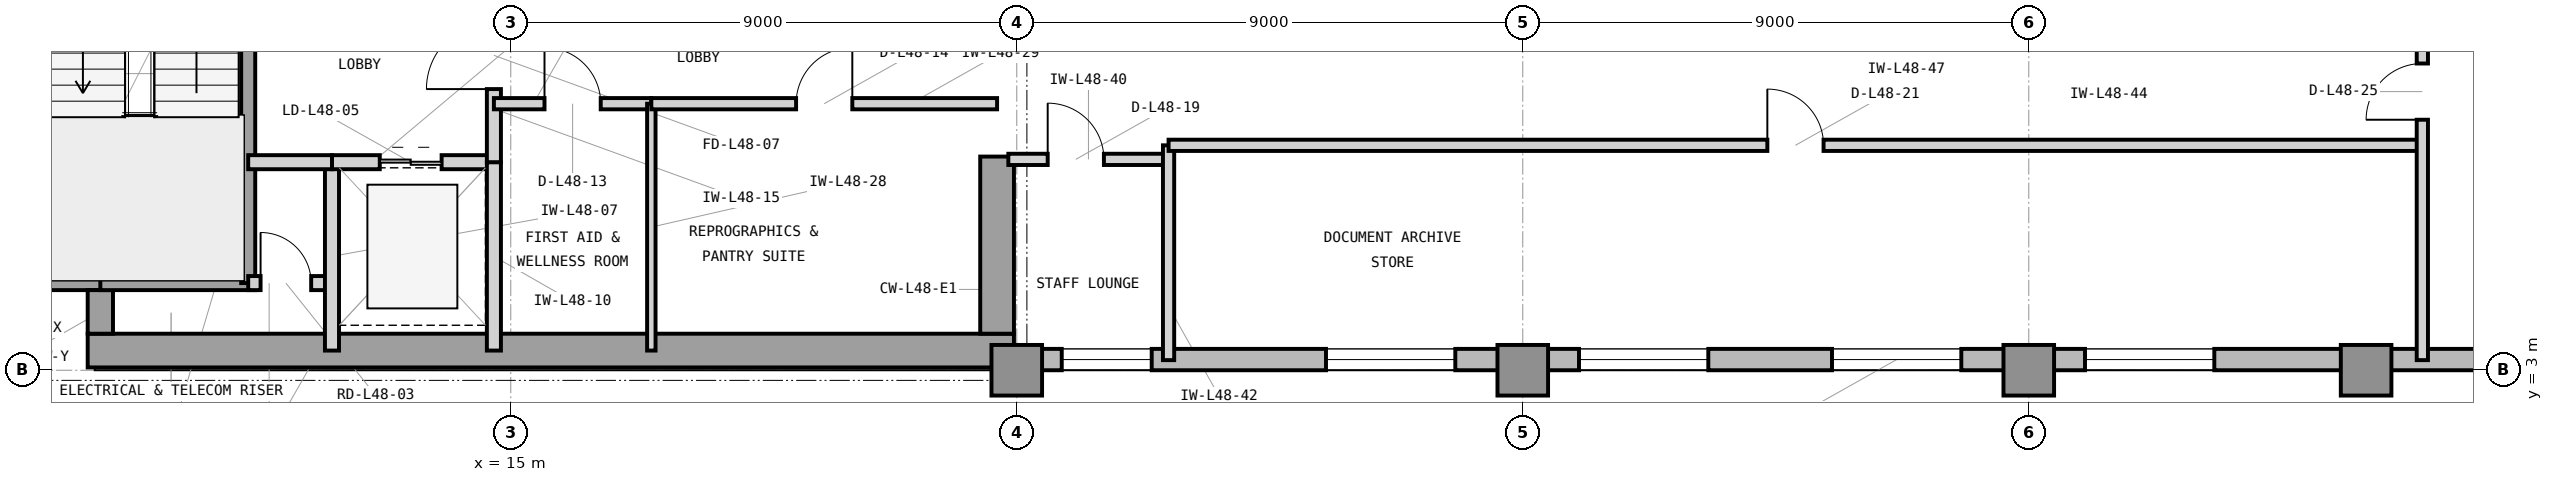
"""IFC4 building model, lengths in metres.
Left out: names, types, materials, properties, quantities, classifications, styles, units other than length and angle.
Written with IfcOpenShell. Run it as: python <this file> out.ifc"""

import sys

from ifc_helpers import new_model, si_unit, direction, frame, frame_2d, origin, origin_2d, place, context, subcontext, project, spatial, rectangle, extrude, element, fill, save


model = new_model("IFC4")
c1 = context("Model", 3, precision=1e-05, world=origin(), true_north=direction((0.0, 1.0)))
c2 = subcontext(c1, "Body", "Model", "MODEL_VIEW")
j1 = project(units=[si_unit("LENGTHUNIT", "METRE"), si_unit("PLANEANGLEUNIT", "RADIAN")], contexts=[c1])
p1 = place(None, origin())
s1 = spatial("IfcSite", under=j1, at=p1, CompositionType="ELEMENT")
p2 = place(p1, origin())
s2 = spatial("IfcBuilding", under=s1, at=p2, CompositionType="ELEMENT")
p3 = place(p2, frame((0.0, 0.0, 199.5)))
s3 = spatial("IfcBuildingStorey", under=s2, at=p3, CompositionType="ELEMENT", Elevation=199.5)
p4 = place(p3, frame((7.475, 3.35, 0.0), z_axis=(0.0, 0.0, 1.0), x_axis=(1.0, 0.0, 0.0)))
e1 = element("IfcWall", 1, at=p4, inside=s3, PredefinedType="SHEAR", context=c2, shape_type="SweptSolid", body=[
    extrude(rectangle(XDim=16.475, YDim=0.6, at=frame_2d((8.237, 0.0))), origin(), (0.0, 0.0, 1.0), 3.9),
])
p5 = place(p3, frame((23.65, 3.65, 0.0), z_axis=(0.0, 0.0, 1.0), x_axis=(0.0, 1.0, 0.0)))
e2 = element("IfcWall", 2, at=p5, inside=s3, PredefinedType="SHEAR", context=c2, shape_type="SweptSolid", body=[
    extrude(rectangle(XDim=3.15, YDim=0.6, at=frame_2d((1.575, 0.0))), origin(), (0.0, 0.0, 1.0), 3.9),
])
p6 = place(p3, frame((6.65, 4.65, 0.0), z_axis=(0.0, 0.0, 1.0), x_axis=(1.0, 0.0, 0.0)))
e3 = element("IfcWall", 3, at=p6, inside=s3, PredefinedType="SHEAR", context=c2, shape_type="SweptSolid", body=[
    extrude(rectangle(XDim=1.275, YDim=0.45, at=frame_2d((0.638, 0.0))), origin(), (0.0, 0.0, 1.0), 3.9),
])
p7 = place(p3, frame((7.7, 3.65, 0.0), z_axis=(0.0, 0.0, 1.0), x_axis=(0.0, 1.0, 0.0)))
e4 = element("IfcWall", 4, at=p7, inside=s3, PredefinedType="SHEAR", context=c2, shape_type="SweptSolid", body=[
    extrude(rectangle(XDim=0.775, YDim=0.45, at=frame_2d((0.388, 0.0))), origin(), (0.0, 0.0, 1.0), 3.9),
])
for number, where, z_axis, x_axis in (
    (5, (24.0, 3.0, 0.0), (0.0, 0.0, 1.0), (1.0, 0.0, 0.0)),
    (6, (33.0, 3.0, 0.0), (0.0, 0.0, 1.0), (1.0, 0.0, 0.0)),
    (7, (42.0, 3.0, 0.0), (0.0, 0.0, 1.0), (1.0, 0.0, 0.0)),
    (8, (48.0, 3.0, 0.0), (0.0, 0.0, 1.0), (1.0, 0.0, 0.0)),
):
    element("IfcColumn", number, at=place(p3, frame(where, z_axis=z_axis, x_axis=x_axis)), inside=s3, PredefinedType="COLUMN", context=c2, shape_type="SweptSolid", body=[
        extrude(rectangle(XDim=0.9, YDim=0.9, at=origin_2d()), origin(), (0.0, 0.0, 1.0), 3.9),
    ])
p8 = place(p3, frame((23.9, 3.19, 0.0), z_axis=(0.0, 0.0, 1.0), x_axis=(1.0, 0.0, 0.0)))
e9 = element("IfcWall", 9, at=p8, inside=s3, PredefinedType="STANDARD", context=c2, shape_type="SweptSolid", body=[
    extrude(rectangle(XDim=31.5, YDim=0.38, at=frame_2d((15.75, 0.0))), origin(), (0.0, 0.0, 1.0), 3.7),
])
p9 = place(p8, frame((5.6, 0.0, 0.9)))
e10 = element("IfcOpeningElement", 10, at=p9, cuts=e9, PredefinedType="OPENING", context=c2, shape_type="SweptSolid", body=[
    extrude(rectangle(XDim=2.3, YDim=2.2, at=frame_2d((1.15, 1.1))), frame((0.0, 0.2, 0.0), z_axis=(0.0, -1.0, 0.0), x_axis=(1.0, 0.0, 0.0)), (0.0, 0.0, 1.0), 0.4),
])
p10 = place(p8, frame((10.1, 0.0, 0.9)))
e11 = element("IfcOpeningElement", 11, at=p10, cuts=e9, PredefinedType="OPENING", context=c2, shape_type="SweptSolid", body=[
    extrude(rectangle(XDim=2.3, YDim=2.2, at=frame_2d((1.15, 1.1))), frame((0.0, 0.2, 0.0), z_axis=(0.0, -1.0, 0.0), x_axis=(1.0, 0.0, 0.0)), (0.0, 0.0, 1.0), 0.4),
])
p11 = place(p8, frame((14.6, 0.0, 0.9)))
e12 = element("IfcOpeningElement", 12, at=p11, cuts=e9, PredefinedType="OPENING", context=c2, shape_type="SweptSolid", body=[
    extrude(rectangle(XDim=2.3, YDim=2.2, at=frame_2d((1.15, 1.1))), frame((0.0, 0.2, 0.0), z_axis=(0.0, -1.0, 0.0), x_axis=(1.0, 0.0, 0.0)), (0.0, 0.0, 1.0), 0.4),
])
p12 = place(p8, frame((19.1, 0.0, 0.9)))
e13 = element("IfcOpeningElement", 13, at=p12, cuts=e9, PredefinedType="OPENING", context=c2, shape_type="SweptSolid", body=[
    extrude(rectangle(XDim=2.3, YDim=2.2, at=frame_2d((1.15, 1.1))), frame((0.0, 0.2, 0.0), z_axis=(0.0, -1.0, 0.0), x_axis=(1.0, 0.0, 0.0)), (0.0, 0.0, 1.0), 0.4),
])
p13 = place(p8, frame((0.9, 0.0, 0.9)))
e14 = element("IfcOpeningElement", 14, at=p13, cuts=e9, PredefinedType="OPENING", context=c2, shape_type="SweptSolid", body=[
    extrude(rectangle(XDim=1.6, YDim=2.2, at=frame_2d((0.8, 1.1))), frame((0.0, 0.2, 0.0), z_axis=(0.0, -1.0, 0.0), x_axis=(1.0, 0.0, 0.0)), (0.0, 0.0, 1.0), 0.4),
])
p14 = place(p3, frame((7.7, 4.55, 0.0), z_axis=(0.0, 0.0, 1.0), x_axis=(1.0, 0.0, 0.0)))
e15 = element("IfcWall", 15, at=p14, inside=s3, PredefinedType="SHEAR", context=c2, shape_type="SweptSolid", body=[
    extrude(rectangle(XDim=2.755, YDim=0.25, at=frame_2d((1.377, 0.0))), origin(), (0.0, 0.0, 1.0), 3.9),
])
p15 = place(p3, frame((10.33, 4.55, 0.0), z_axis=(0.0, 0.0, 1.0), x_axis=(0.0, 1.0, 0.0)))
e16 = element("IfcWall", 16, at=p15, inside=s3, PredefinedType="SHEAR", context=c2, shape_type="SweptSolid", body=[
    extrude(rectangle(XDim=7.45, YDim=0.25, at=frame_2d((3.725, 0.0))), origin(), (0.0, 0.0, 1.0), 3.9),
])
p16 = place(p15, frame((5.9, 0.0, 0.0)))
e17 = element("IfcOpeningElement", 17, at=p16, cuts=e16, PredefinedType="OPENING", context=c2, shape_type="SweptSolid", body=[
    extrude(rectangle(XDim=1.25, YDim=2.2, at=frame_2d((0.625, 1.1))), frame((0.0, 0.135, 0.0), z_axis=(0.0, -1.0, 0.0), x_axis=(1.0, 0.0, 0.0)), (0.0, 0.0, 1.0), 0.27),
])
p17 = place(p3, frame((10.33, 4.55, 0.0), z_axis=(0.0, 0.0, 1.0), x_axis=(1.0, 0.0, 0.0)))
e18 = element("IfcWall", 18, at=p17, inside=s3, PredefinedType="PARTITIONING", context=c2, shape_type="SweptSolid", body=[
    extrude(rectangle(XDim=1.49, YDim=0.25, at=frame_2d((0.745, 0.0))), origin(), (0.0, 0.0, 1.0), 3.69),
])
p18 = place(p17, frame((0.22, 0.0, 0.0)))
e19 = element("IfcOpeningElement", 19, at=p18, cuts=e18, PredefinedType="OPENING", context=c2, shape_type="SweptSolid", body=[
    extrude(rectangle(XDim=0.9, YDim=2.1, at=frame_2d((0.45, 1.05))), frame((0.0, 0.135, 0.0), z_axis=(0.0, -1.0, 0.0), x_axis=(1.0, 0.0, 0.0)), (0.0, 0.0, 1.0), 0.27),
])
p19 = place(p3, frame((11.82, 3.35, 0.0), z_axis=(0.0, 0.0, 1.0), x_axis=(0.0, 1.0, 0.0)))
e20 = element("IfcWall", 20, at=p19, inside=s3, PredefinedType="PARTITIONING", context=c2, shape_type="SweptSolid", body=[
    extrude(rectangle(XDim=3.35, YDim=0.25, at=frame_2d((1.675, 0.0))), origin(), (0.0, 0.0, 1.0), 3.69),
])
p20 = place(p3, frame((11.82, 6.7, 0.0), z_axis=(0.0, 0.0, 1.0), x_axis=(1.0, 0.0, 0.0)))
e21 = element("IfcWall", 21, at=p20, inside=s3, PredefinedType="PARTITIONING", context=c2, shape_type="SweptSolid", body=[
    extrude(rectangle(XDim=2.88, YDim=0.25, at=frame_2d((1.44, 0.0))), origin(), (0.0, 0.0, 1.0), 3.283),
])
p21 = place(p20, frame((0.85, 0.0, 0.0)))
e22 = element("IfcOpeningElement", 22, at=p21, cuts=e21, PredefinedType="OPENING", context=c2, shape_type="SweptSolid", body=[
    extrude(rectangle(XDim=1.1, YDim=2.25, at=frame_2d((0.55, 1.125))), frame((0.0, 0.135, 0.0), z_axis=(0.0, -1.0, 0.0), x_axis=(1.0, 0.0, 0.0)), (0.0, 0.0, 1.0), 0.27),
])
p22 = place(p3, frame((14.7, 3.35, 0.0), z_axis=(0.0, 0.0, 1.0), x_axis=(0.0, 1.0, 0.0)))
e23 = element("IfcWall", 23, at=p22, inside=s3, PredefinedType="PARTITIONING", context=c2, shape_type="SweptSolid", body=[
    extrude(rectangle(XDim=3.35, YDim=0.25, at=frame_2d((1.675, 0.0))), origin(), (0.0, 0.0, 1.0), 3.69),
])
p23 = place(p3, frame((14.7, 6.7, 0.0), z_axis=(0.0, 0.0, 1.0), x_axis=(0.0, 1.0, 0.0)))
e24 = element("IfcWall", 24, at=p23, inside=s3, PredefinedType="PARTITIONING", context=c2, shape_type="SweptSolid", body=[
    extrude(rectangle(XDim=3.8, YDim=0.25, at=frame_2d((1.9, 0.0))), origin(), (0.0, 0.0, 1.0), 3.69),
])
p24 = place(p23, frame((1.3, 0.0, 0.0)))
e25 = element("IfcOpeningElement", 25, at=p24, cuts=e24, PredefinedType="OPENING", context=c2, shape_type="SweptSolid", body=[
    extrude(rectangle(XDim=1.2, YDim=2.2, at=frame_2d((0.6, 1.1))), frame((0.0, 0.135, 0.0), z_axis=(0.0, -1.0, 0.0), x_axis=(1.0, 0.0, 0.0)), (0.0, 0.0, 1.0), 0.27),
])
p25 = place(p3, frame((10.33, 6.7, 0.0), z_axis=(0.0, 0.0, 1.0), x_axis=(1.0, 0.0, 0.0)))
e26 = element("IfcWall", 26, at=p25, inside=s3, PredefinedType="PARTITIONING", context=c2, shape_type="SweptSolid", body=[
    extrude(rectangle(XDim=1.49, YDim=0.25, at=frame_2d((0.745, 0.0))), origin(), (0.0, 0.0, 1.0), 3.283),
])
p26 = place(p3, frame((14.7, 7.74, 0.0), z_axis=(0.0, 0.0, 1.0), x_axis=(1.0, 0.0, 0.0)))
e27 = element("IfcWall", 27, at=p26, inside=s3, PredefinedType="PARTITIONING", context=c2, shape_type="SweptSolid", body=[
    extrude(rectangle(XDim=2.8, YDim=0.2, at=frame_2d((1.4, 0.0))), origin(), (0.0, 0.0, 1.0), 3.69),
])
p27 = place(p26, frame((0.9, 0.0, 0.0)))
e28 = element("IfcOpeningElement", 28, at=p27, cuts=e27, PredefinedType="OPENING", context=c2, shape_type="SweptSolid", body=[
    extrude(rectangle(XDim=1.0, YDim=2.15, at=frame_2d((0.5, 1.075))), frame((0.0, 0.11, 0.0), z_axis=(0.0, -1.0, 0.0), x_axis=(1.0, 0.0, 0.0)), (0.0, 0.0, 1.0), 0.22),
])
p28 = place(p3, frame((17.5, 3.35, 0.0), z_axis=(0.0, 0.0, 1.0), x_axis=(0.0, 1.0, 0.0)))
e29 = element("IfcWall", 29, at=p28, inside=s3, PredefinedType="PARTITIONING", context=c2, shape_type="SweptSolid", body=[
    extrude(rectangle(XDim=4.39, YDim=0.15, at=frame_2d((2.195, 0.0))), origin(), (0.0, 0.0, 1.0), 3.69),
])
p29 = place(p3, frame((17.5, 7.74, 0.0), z_axis=(0.0, 0.0, 1.0), x_axis=(1.0, 0.0, 0.0)))
e30 = element("IfcWall", 30, at=p29, inside=s3, PredefinedType="PARTITIONING", context=c2, shape_type="SweptSolid", body=[
    extrude(rectangle(XDim=6.15, YDim=0.2, at=frame_2d((3.075, 0.0))), origin(), (0.0, 0.0, 1.0), 3.69),
])
p30 = place(p29, frame((2.575, 0.0, 0.0)))
e31 = element("IfcOpeningElement", 31, at=p30, cuts=e30, PredefinedType="OPENING", context=c2, shape_type="SweptSolid", body=[
    extrude(rectangle(XDim=1.0, YDim=2.15, at=frame_2d((0.5, 1.075))), frame((0.0, 0.11, 0.0), z_axis=(0.0, -1.0, 0.0), x_axis=(1.0, 0.0, 0.0)), (0.0, 0.0, 1.0), 0.22),
])
p31 = place(p3, frame((23.85, 6.75, 0.0), z_axis=(0.0, 0.0, 1.0), x_axis=(1.0, 0.0, 0.0)))
e32 = element("IfcWall", 32, at=p31, inside=s3, PredefinedType="PARTITIONING", context=c2, shape_type="SweptSolid", body=[
    extrude(rectangle(XDim=2.85, YDim=0.2, at=frame_2d((1.425, 0.0))), origin(), (0.0, 0.0, 1.0), 3.69),
])
p32 = place(p31, frame((0.7, 0.0, 0.0)))
e33 = element("IfcOpeningElement", 33, at=p32, cuts=e32, PredefinedType="OPENING", context=c2, shape_type="SweptSolid", body=[
    extrude(rectangle(XDim=1.0, YDim=2.15, at=frame_2d((0.5, 1.075))), frame((0.0, 0.11, 0.0), z_axis=(0.0, -1.0, 0.0), x_axis=(1.0, 0.0, 0.0)), (0.0, 0.0, 1.0), 0.22),
])
p33 = place(p3, frame((26.7, 3.18, 0.0), z_axis=(0.0, 0.0, 1.0), x_axis=(0.0, 1.0, 0.0)))
e34 = element("IfcWall", 34, at=p33, inside=s3, PredefinedType="PARTITIONING", context=c2, shape_type="SweptSolid", body=[
    extrude(rectangle(XDim=3.82, YDim=0.2, at=frame_2d((1.91, 0.0))), origin(), (0.0, 0.0, 1.0), 3.69),
])
p34 = place(p3, frame((26.7, 7.0, 0.0), z_axis=(0.0, 0.0, 1.0), x_axis=(1.0, 0.0, 0.0)))
e35 = element("IfcWall", 35, at=p34, inside=s3, PredefinedType="PARTITIONING", context=c2, shape_type="SweptSolid", body=[
    extrude(rectangle(XDim=22.3, YDim=0.2, at=frame_2d((11.15, 0.0))), origin(), (0.0, 0.0, 1.0), 3.69),
])
p35 = place(p34, frame((10.65, 0.0, 0.0)))
e36 = element("IfcOpeningElement", 36, at=p35, cuts=e35, PredefinedType="OPENING", context=c2, shape_type="SweptSolid", body=[
    extrude(rectangle(XDim=1.0, YDim=2.15, at=frame_2d((0.5, 1.075))), frame((0.0, 0.11, 0.0), z_axis=(0.0, -1.0, 0.0), x_axis=(1.0, 0.0, 0.0)), (0.0, 0.0, 1.0), 0.22),
])
p36 = place(p3, frame((49.0, 3.18, 0.0), z_axis=(0.0, 0.0, 1.0), x_axis=(0.0, 1.0, 0.0)))
e37 = element("IfcWall", 37, at=p36, inside=s3, PredefinedType="PARTITIONING", context=c2, shape_type="SweptSolid", body=[
    extrude(rectangle(XDim=17.64, YDim=0.2, at=frame_2d((8.82, 0.0))), origin(), (0.0, 0.0, 1.0), 3.69),
])
p37 = place(p36, frame((4.275, 0.0, 0.0)))
e38 = element("IfcOpeningElement", 38, at=p37, cuts=e37, PredefinedType="OPENING", context=c2, shape_type="SweptSolid", body=[
    extrude(rectangle(XDim=1.0, YDim=2.15, at=frame_2d((0.5, 1.075))), frame((0.0, 0.11, 0.0), z_axis=(0.0, -1.0, 0.0), x_axis=(1.0, 0.0, 0.0)), (0.0, 0.0, 1.0), 0.22),
])
p38 = place(p9, origin())
e39 = element("IfcWindow", 39, at=p38, inside=s3, PartitioningType="SINGLE_PANEL", PredefinedType="WINDOW", context=c2, shape_type="SweptSolid", body=[
    extrude(rectangle(XDim=2.3, YDim=2.2, at=frame_2d((1.15, 1.1))), frame((0.0, 0.11, 0.0), z_axis=(0.0, -1.0, 0.0), x_axis=(1.0, 0.0, 0.0)), (0.0, 0.0, 1.0), 0.06),
])
fill(e10, e39)
p39 = place(p10, origin())
e40 = element("IfcWindow", 40, at=p39, inside=s3, PartitioningType="SINGLE_PANEL", PredefinedType="WINDOW", context=c2, shape_type="SweptSolid", body=[
    extrude(rectangle(XDim=2.3, YDim=2.2, at=frame_2d((1.15, 1.1))), frame((0.0, 0.11, 0.0), z_axis=(0.0, -1.0, 0.0), x_axis=(1.0, 0.0, 0.0)), (0.0, 0.0, 1.0), 0.06),
])
fill(e11, e40)
p40 = place(p11, origin())
e41 = element("IfcWindow", 41, at=p40, inside=s3, PartitioningType="SINGLE_PANEL", PredefinedType="WINDOW", context=c2, shape_type="SweptSolid", body=[
    extrude(rectangle(XDim=2.3, YDim=2.2, at=frame_2d((1.15, 1.1))), frame((0.0, 0.11, 0.0), z_axis=(0.0, -1.0, 0.0), x_axis=(1.0, 0.0, 0.0)), (0.0, 0.0, 1.0), 0.06),
])
fill(e12, e41)
p41 = place(p12, origin())
e42 = element("IfcWindow", 42, at=p41, inside=s3, PartitioningType="SINGLE_PANEL", PredefinedType="WINDOW", context=c2, shape_type="SweptSolid", body=[
    extrude(rectangle(XDim=2.3, YDim=2.2, at=frame_2d((1.15, 1.1))), frame((0.0, 0.11, 0.0), z_axis=(0.0, -1.0, 0.0), x_axis=(1.0, 0.0, 0.0)), (0.0, 0.0, 1.0), 0.06),
])
fill(e13, e42)
p42 = place(p18, origin())
e43 = element("IfcDoor", 43, at=p42, inside=s3, OperationType="SINGLE_SWING_LEFT", PredefinedType="TRAPDOOR", context=c2, shape_type="SweptSolid", body=[
    extrude(rectangle(XDim=0.9, YDim=2.1, at=frame_2d((0.45, 1.05))), frame((0.0, 0.025, 0.0), z_axis=(0.0, -1.0, 0.0), x_axis=(1.0, 0.0, 0.0)), (0.0, 0.0, 1.0), 0.05),
])
fill(e19, e43)
p43 = place(p21, origin())
e44 = element("IfcDoor", 44, at=p43, inside=s3, OperationType="DOUBLE_DOOR_SLIDING", PredefinedType="DOOR", context=c2, shape_type="SweptSolid", body=[
    extrude(rectangle(XDim=1.1, YDim=2.25, at=frame_2d((0.55, 1.125))), frame((0.0, 0.025, 0.0), z_axis=(0.0, -1.0, 0.0), x_axis=(1.0, 0.0, 0.0)), (0.0, 0.0, 1.0), 0.05),
])
fill(e22, e44)
p44 = place(p24, origin())
e45 = element("IfcDoor", 45, at=p44, inside=s3, OperationType="SINGLE_SWING_LEFT", PredefinedType="DOOR", context=c2, shape_type="SweptSolid", body=[
    extrude(rectangle(XDim=1.2, YDim=2.2, at=frame_2d((0.6, 1.1))), frame((0.0, 0.025, 0.0), z_axis=(0.0, -1.0, 0.0), x_axis=(1.0, 0.0, 0.0)), (0.0, 0.0, 1.0), 0.05),
])
fill(e25, e45)
p45 = place(p27, origin())
e46 = element("IfcDoor", 46, at=p45, inside=s3, OperationType="SINGLE_SWING_LEFT", PredefinedType="DOOR", context=c2, shape_type="SweptSolid", body=[
    extrude(rectangle(XDim=1.0, YDim=2.15, at=frame_2d((0.5, 1.075))), frame((0.0, 0.025, 0.0), z_axis=(0.0, -1.0, 0.0), x_axis=(1.0, 0.0, 0.0)), (0.0, 0.0, 1.0), 0.05),
])
fill(e28, e46)
p46 = place(p30, origin())
e47 = element("IfcDoor", 47, at=p46, inside=s3, OperationType="SINGLE_SWING_RIGHT", PredefinedType="DOOR", context=c2, shape_type="SweptSolid", body=[
    extrude(rectangle(XDim=1.0, YDim=2.15, at=frame_2d((0.5, 1.075))), frame((0.0, 0.025, 0.0), z_axis=(0.0, -1.0, 0.0), x_axis=(1.0, 0.0, 0.0)), (0.0, 0.0, 1.0), 0.05),
])
fill(e31, e47)
p47 = place(p32, origin())
e48 = element("IfcDoor", 48, at=p47, inside=s3, OperationType="SINGLE_SWING_LEFT", PredefinedType="DOOR", context=c2, shape_type="SweptSolid", body=[
    extrude(rectangle(XDim=1.0, YDim=2.15, at=frame_2d((0.5, 1.075))), frame((0.0, 0.025, 0.0), z_axis=(0.0, -1.0, 0.0), x_axis=(1.0, 0.0, 0.0)), (0.0, 0.0, 1.0), 0.05),
])
fill(e33, e48)
p48 = place(p35, origin())
e49 = element("IfcDoor", 49, at=p48, inside=s3, OperationType="SINGLE_SWING_LEFT", PredefinedType="DOOR", context=c2, shape_type="SweptSolid", body=[
    extrude(rectangle(XDim=1.0, YDim=2.15, at=frame_2d((0.5, 1.075))), frame((0.0, 0.025, 0.0), z_axis=(0.0, -1.0, 0.0), x_axis=(1.0, 0.0, 0.0)), (0.0, 0.0, 1.0), 0.05),
])
fill(e36, e49)
p49 = place(p37, origin())
e50 = element("IfcDoor", 50, at=p49, inside=s3, OperationType="SINGLE_SWING_LEFT", PredefinedType="DOOR", context=c2, shape_type="SweptSolid", body=[
    extrude(rectangle(XDim=1.0, YDim=2.15, at=frame_2d((0.5, 1.075))), frame((0.0, 0.025, 0.0), z_axis=(0.0, -1.0, 0.0), x_axis=(1.0, 0.0, 0.0)), (0.0, 0.0, 1.0), 0.05),
])
fill(e38, e50)
p50 = place(p13, origin())
e51 = element("IfcWindow", 51, at=p50, inside=s3, PartitioningType="SINGLE_PANEL", PredefinedType="WINDOW", context=c2, shape_type="SweptSolid", body=[
    extrude(rectangle(XDim=1.6, YDim=2.2, at=frame_2d((0.8, 1.1))), frame((0.0, 0.11, 0.0), z_axis=(0.0, -1.0, 0.0), x_axis=(1.0, 0.0, 0.0)), (0.0, 0.0, 1.0), 0.06),
])
fill(e14, e51)
save(model, sys.argv[1])
